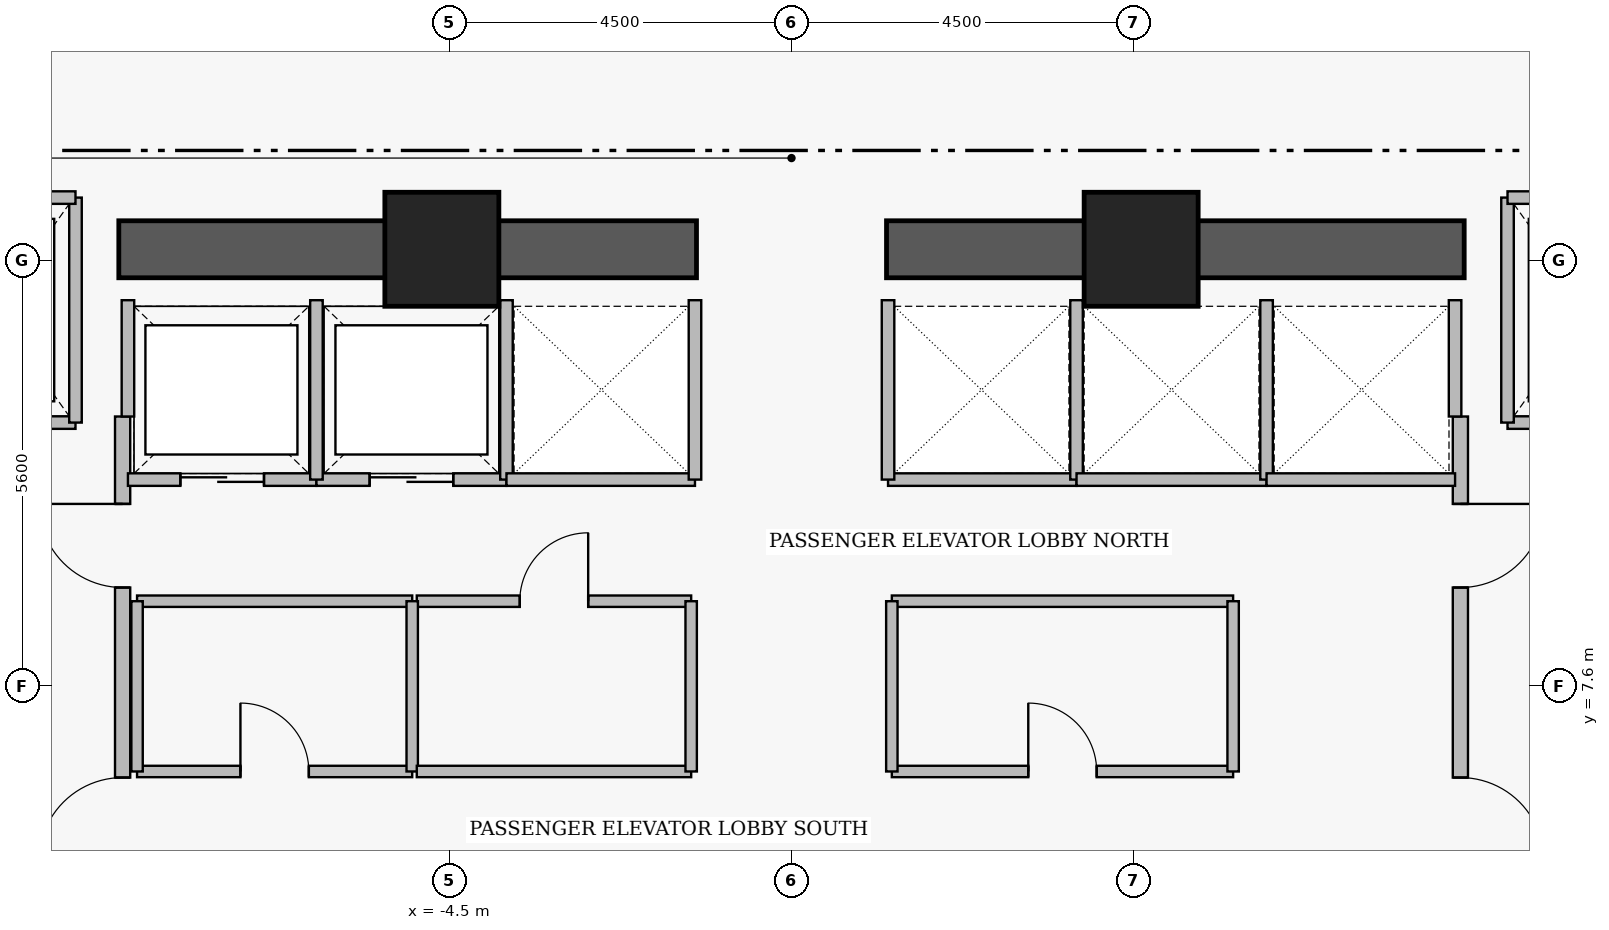
"""IFC4 building model, lengths in metres.
Left out: names, types, materials, properties, quantities, classifications, styles, units other than length and angle.
Written with IfcOpenShell. Run it as: python <this file> out.ifc"""

import sys

from ifc_helpers import new_model, si_unit, direction, frame, frame_2d, origin, origin_2d, place, context, subcontext, project, spatial, rectangle, extrude, element, fill, save


model = new_model("IFC4")
c1 = context("Model", 3, precision=1e-05, world=origin(), true_north=direction((0.0, 1.0)))
c2 = subcontext(c1, "Body", "Model", "MODEL_VIEW")
j1 = project(units=[si_unit("LENGTHUNIT", "METRE"), si_unit("PLANEANGLEUNIT", "RADIAN")], contexts=[c1])
p1 = place(None, origin())
s1 = spatial("IfcSite", under=j1, at=p1, CompositionType="ELEMENT")
p2 = place(p1, origin())
s2 = spatial("IfcBuilding", under=s1, at=p2, CompositionType="ELEMENT")
p3 = place(p2, frame((0.0, 0.0, 95.65)))
s3 = spatial("IfcBuildingStorey", under=s2, at=p3, CompositionType="ELEMENT", Elevation=95.65)
for number, where, z_axis, x_axis in (
    (1, (-8.85, 13.35, 0.0), (0.0, 0.0, 1.0), (1.0, 0.0, 0.0)),
    (2, (1.25, 13.35, 0.0), (0.0, 0.0, 1.0), (1.0, 0.0, 0.0)),
):
    element("IfcWall", number, at=place(p3, frame(where, z_axis=z_axis, x_axis=x_axis)), inside=s3, PredefinedType="SHEAR", context=c2, shape_type="SweptSolid", body=[
        extrude(rectangle(XDim=7.6, YDim=0.75, at=frame_2d((3.8, 0.0))), origin(), (0.0, 0.0, 1.0), 3.43),
    ])
for number, where, z_axis, x_axis in (
    (3, (-4.6, 13.35, 0.0), (0.0, 0.0, 1.0), (1.0, 0.0, 0.0)),
    (4, (4.6, 13.35, 0.0), (0.0, 0.0, 1.0), (1.0, 0.0, 0.0)),
):
    element("IfcColumn", number, at=place(p3, frame(where, z_axis=z_axis, x_axis=x_axis)), inside=s3, PredefinedType="COLUMN", context=c2, shape_type="SweptSolid", body=[
        extrude(rectangle(XDim=1.5, YDim=1.5, at=origin_2d()), origin(), (0.0, 0.0, 1.0), 3.65),
    ])
p4 = place(p3, frame((-8.8, 5.05, 0.0), z_axis=(0.0, 0.0, 1.0), x_axis=(0.0, 1.0, 0.0)))
e5 = element("IfcWall", 5, at=p4, inside=s3, PredefinedType="PARTITIONING", context=c2, shape_type="SweptSolid", body=[
    extrude(rectangle(XDim=6.1, YDim=0.2, at=frame_2d((3.05, 0.0))), origin(), (0.0, 0.0, 1.0), 3.43),
])
p5 = place(p4, frame((0.25, 0.0, 0.0)))
e6 = element("IfcOpeningElement", 6, at=p5, cuts=e5, PredefinedType="OPENING", context=c2, shape_type="SweptSolid", body=[
    extrude(rectangle(XDim=1.1, YDim=2.2, at=frame_2d((0.55, 1.1))), frame((0.0, 0.11, 0.0), z_axis=(0.0, -1.0, 0.0), x_axis=(1.0, 0.0, 0.0)), (0.0, 0.0, 1.0), 0.22),
])
p6 = place(p4, frame((3.85, 0.0, 0.0)))
e7 = element("IfcOpeningElement", 7, at=p6, cuts=e5, PredefinedType="OPENING", context=c2, shape_type="SweptSolid", body=[
    extrude(rectangle(XDim=1.1, YDim=2.2, at=frame_2d((0.55, 1.1))), frame((0.0, 0.11, 0.0), z_axis=(0.0, -1.0, 0.0), x_axis=(1.0, 0.0, 0.0)), (0.0, 0.0, 1.0), 0.22),
])
p7 = place(p3, frame((8.8, 11.15, 0.0), z_axis=(0.0, 0.0, 1.0), x_axis=(0.0, -1.0, 0.0)))
e8 = element("IfcWall", 8, at=p7, inside=s3, PredefinedType="PARTITIONING", context=c2, shape_type="SweptSolid", body=[
    extrude(rectangle(XDim=6.1, YDim=0.2, at=frame_2d((3.05, 0.0))), origin(), (0.0, 0.0, 1.0), 3.43),
])
p8 = place(p7, frame((1.15, 0.0, 0.0)))
e9 = element("IfcOpeningElement", 9, at=p8, cuts=e8, PredefinedType="OPENING", context=c2, shape_type="SweptSolid", body=[
    extrude(rectangle(XDim=1.1, YDim=2.2, at=frame_2d((0.55, 1.1))), frame((0.0, 0.11, 0.0), z_axis=(0.0, -1.0, 0.0), x_axis=(1.0, 0.0, 0.0)), (0.0, 0.0, 1.0), 0.22),
])
p9 = place(p7, frame((4.75, 0.0, 0.0)))
e10 = element("IfcOpeningElement", 10, at=p9, cuts=e8, PredefinedType="OPENING", context=c2, shape_type="SweptSolid", body=[
    extrude(rectangle(XDim=1.1, YDim=2.2, at=frame_2d((0.55, 1.1))), frame((0.0, 0.11, 0.0), z_axis=(0.0, -1.0, 0.0), x_axis=(1.0, 0.0, 0.0)), (0.0, 0.0, 1.0), 0.22),
])
p10 = place(p3, frame((-11.58, 11.07, 0.0), z_axis=(0.0, 0.0, 1.0), x_axis=(1.0, 0.0, 0.0)))
e11 = element("IfcWall", 11, at=p10, inside=s3, PredefinedType="PARTITIONING", context=c2, shape_type="SweptSolid", body=[
    extrude(rectangle(XDim=2.16, YDim=0.165, at=frame_2d((1.08, 0.0))), origin(), (0.0, 0.0, 1.0), 3.43),
])
p11 = place(p10, frame((0.53, 0.0, 0.0)))
e12 = element("IfcOpeningElement", 12, at=p11, cuts=e11, PredefinedType="OPENING", context=c2, shape_type="SweptSolid", body=[
    extrude(rectangle(XDim=1.15, YDim=2.25, at=frame_2d((0.575, 1.125))), frame((0.0, 0.093, 0.0), z_axis=(0.0, -1.0, 0.0), x_axis=(1.0, 0.0, 0.0)), (0.0, 0.0, 1.0), 0.185),
])
p12 = place(p3, frame((9.42, 11.07, 0.0), z_axis=(0.0, 0.0, 1.0), x_axis=(1.0, 0.0, 0.0)))
e13 = element("IfcWall", 13, at=p12, inside=s3, PredefinedType="PARTITIONING", context=c2, shape_type="SweptSolid", body=[
    extrude(rectangle(XDim=2.16, YDim=0.165, at=frame_2d((1.08, 0.0))), origin(), (0.0, 0.0, 1.0), 3.43),
])
p13 = place(p12, frame((0.53, 0.0, 0.0)))
e14 = element("IfcOpeningElement", 14, at=p13, cuts=e13, PredefinedType="OPENING", context=c2, shape_type="SweptSolid", body=[
    extrude(rectangle(XDim=1.15, YDim=2.25, at=frame_2d((0.575, 1.125))), frame((0.0, 0.093, 0.0), z_axis=(0.0, -1.0, 0.0), x_axis=(1.0, 0.0, 0.0)), (0.0, 0.0, 1.0), 0.185),
])
p14 = place(p3, frame((-8.73, 10.32, 0.0), z_axis=(0.0, 0.0, 1.0), x_axis=(1.0, 0.0, 0.0)))
e15 = element("IfcWall", 15, at=p14, inside=s3, PredefinedType="PARTITIONING", context=c2, shape_type="SweptSolid", body=[
    extrude(rectangle(XDim=2.48, YDim=0.165, at=frame_2d((1.24, 0.0))), origin(), (0.0, 0.0, 1.0), 3.43),
])
p15 = place(p14, frame((0.69, 0.0, 0.0)))
e16 = element("IfcOpeningElement", 16, at=p15, cuts=e15, PredefinedType="OPENING", context=c2, shape_type="SweptSolid", body=[
    extrude(rectangle(XDim=1.1, YDim=2.25, at=frame_2d((0.55, 1.125))), frame((0.0, 0.093, 0.0), z_axis=(0.0, -1.0, 0.0), x_axis=(1.0, 0.0, 0.0)), (0.0, 0.0, 1.0), 0.185),
])
p16 = place(p3, frame((-6.25, 10.32, 0.0), z_axis=(0.0, 0.0, 1.0), x_axis=(1.0, 0.0, 0.0)))
e17 = element("IfcWall", 17, at=p16, inside=s3, PredefinedType="PARTITIONING", context=c2, shape_type="SweptSolid", body=[
    extrude(rectangle(XDim=2.5, YDim=0.165, at=frame_2d((1.25, 0.0))), origin(), (0.0, 0.0, 1.0), 3.43),
])
p17 = place(p16, frame((0.7, 0.0, 0.0)))
e18 = element("IfcOpeningElement", 18, at=p17, cuts=e17, PredefinedType="OPENING", context=c2, shape_type="SweptSolid", body=[
    extrude(rectangle(XDim=1.1, YDim=2.25, at=frame_2d((0.55, 1.125))), frame((0.0, 0.093, 0.0), z_axis=(0.0, -1.0, 0.0), x_axis=(1.0, 0.0, 0.0)), (0.0, 0.0, 1.0), 0.185),
])
p18 = place(p3, frame((-8.61, 6.48, 0.0), z_axis=(0.0, 0.0, 1.0), x_axis=(1.0, 0.0, 0.0)))
e19 = element("IfcWall", 19, at=p18, inside=s3, PredefinedType="PARTITIONING", context=c2, shape_type="SweptSolid", body=[
    extrude(rectangle(XDim=3.62, YDim=0.15, at=frame_2d((1.81, 0.0))), origin(), (0.0, 0.0, 1.0), 3.43),
])
p19 = place(p18, frame((1.36, 0.0, 0.0)))
e20 = element("IfcOpeningElement", 20, at=p19, cuts=e19, PredefinedType="OPENING", context=c2, shape_type="SweptSolid", body=[
    extrude(rectangle(XDim=0.9, YDim=2.15, at=frame_2d((0.45, 1.075))), frame((0.0, 0.085, 0.0), z_axis=(0.0, -1.0, 0.0), x_axis=(1.0, 0.0, 0.0)), (0.0, 0.0, 1.0), 0.17),
])
p20 = place(p3, frame((-4.93, 8.72, 0.0), z_axis=(0.0, 0.0, 1.0), x_axis=(1.0, 0.0, 0.0)))
e21 = element("IfcWall", 21, at=p20, inside=s3, PredefinedType="PARTITIONING", context=c2, shape_type="SweptSolid", body=[
    extrude(rectangle(XDim=3.61, YDim=0.15, at=frame_2d((1.805, 0.0))), origin(), (0.0, 0.0, 1.0), 3.43),
])
p21 = place(p20, frame((1.355, 0.0, 0.0)))
e22 = element("IfcOpeningElement", 22, at=p21, cuts=e21, PredefinedType="OPENING", context=c2, shape_type="SweptSolid", body=[
    extrude(rectangle(XDim=0.9, YDim=2.15, at=frame_2d((0.45, 1.075))), frame((0.0, 0.085, 0.0), z_axis=(0.0, -1.0, 0.0), x_axis=(1.0, 0.0, 0.0)), (0.0, 0.0, 1.0), 0.17),
])
p22 = place(p3, frame((1.32, 6.48, 0.0), z_axis=(0.0, 0.0, 1.0), x_axis=(1.0, 0.0, 0.0)))
e23 = element("IfcWall", 23, at=p22, inside=s3, PredefinedType="PARTITIONING", context=c2, shape_type="SweptSolid", body=[
    extrude(rectangle(XDim=4.49, YDim=0.15, at=frame_2d((2.245, 0.0))), origin(), (0.0, 0.0, 1.0), 3.43),
])
p23 = place(p22, frame((1.795, 0.0, 0.0)))
e24 = element("IfcOpeningElement", 24, at=p23, cuts=e23, PredefinedType="OPENING", context=c2, shape_type="SweptSolid", body=[
    extrude(rectangle(XDim=0.9, YDim=2.15, at=frame_2d((0.45, 1.075))), frame((0.0, 0.085, 0.0), z_axis=(0.0, -1.0, 0.0), x_axis=(1.0, 0.0, 0.0)), (0.0, 0.0, 1.0), 0.17),
])
p24 = place(p3, frame((-9.42, 11.07, 0.0), z_axis=(0.0, 0.0, 1.0), x_axis=(0.0, 1.0, 0.0)))
e25 = element("IfcWall", 25, at=p24, inside=s3, PredefinedType="PARTITIONING", context=c2, shape_type="SweptSolid", body=[
    extrude(rectangle(XDim=2.96, YDim=0.165, at=frame_2d((1.48, 0.0))), origin(), (0.0, 0.0, 1.0), 3.43),
])
p25 = place(p3, frame((-11.58, 14.03, 0.0), z_axis=(0.0, 0.0, 1.0), x_axis=(1.0, 0.0, 0.0)))
e26 = element("IfcWall", 26, at=p25, inside=s3, PredefinedType="PARTITIONING", context=c2, shape_type="SweptSolid", body=[
    extrude(rectangle(XDim=2.16, YDim=0.165, at=frame_2d((1.08, 0.0))), origin(), (0.0, 0.0, 1.0), 3.43),
])
p26 = place(p3, frame((9.42, 11.07, 0.0), z_axis=(0.0, 0.0, 1.0), x_axis=(0.0, 1.0, 0.0)))
e27 = element("IfcWall", 27, at=p26, inside=s3, PredefinedType="PARTITIONING", context=c2, shape_type="SweptSolid", body=[
    extrude(rectangle(XDim=2.96, YDim=0.165, at=frame_2d((1.48, 0.0))), origin(), (0.0, 0.0, 1.0), 3.43),
])
p27 = place(p3, frame((9.42, 14.03, 0.0), z_axis=(0.0, 0.0, 1.0), x_axis=(1.0, 0.0, 0.0)))
e28 = element("IfcWall", 28, at=p27, inside=s3, PredefinedType="PARTITIONING", context=c2, shape_type="SweptSolid", body=[
    extrude(rectangle(XDim=2.16, YDim=0.165, at=frame_2d((1.08, 0.0))), origin(), (0.0, 0.0, 1.0), 3.43),
])
p28 = place(p3, frame((-8.73, 11.15, 0.0), z_axis=(0.0, 0.0, 1.0), x_axis=(0.0, 1.0, 0.0)))
e29 = element("IfcWall", 29, at=p28, inside=s3, PredefinedType="PARTITIONING", context=c2, shape_type="SweptSolid", body=[
    extrude(rectangle(XDim=1.53, YDim=0.165, at=frame_2d((0.765, 0.0))), origin(), (0.0, 0.0, 1.0), 3.43),
])
for number, where, z_axis, x_axis in (
    (30, (-6.25, 10.32, 0.0), (0.0, 0.0, 1.0), (0.0, 1.0, 0.0)),
    (31, (-3.75, 10.32, 0.0), (0.0, 0.0, 1.0), (0.0, 1.0, 0.0)),
):
    element("IfcWall", number, at=place(p3, frame(where, z_axis=z_axis, x_axis=x_axis)), inside=s3, PredefinedType="PARTITIONING", context=c2, shape_type="SweptSolid", body=[
        extrude(rectangle(XDim=2.36, YDim=0.165, at=frame_2d((1.18, 0.0))), origin(), (0.0, 0.0, 1.0), 3.43),
    ])
p29 = place(p3, frame((-3.75, 10.32, 0.0), z_axis=(0.0, 0.0, 1.0), x_axis=(1.0, 0.0, 0.0)))
e32 = element("IfcWall", 32, at=p29, inside=s3, PredefinedType="PARTITIONING", context=c2, shape_type="SweptSolid", body=[
    extrude(rectangle(XDim=2.48, YDim=0.165, at=frame_2d((1.24, 0.0))), origin(), (0.0, 0.0, 1.0), 3.43),
])
p30 = place(p3, frame((-1.27, 10.32, 0.0), z_axis=(0.0, 0.0, 1.0), x_axis=(0.0, 1.0, 0.0)))
e33 = element("IfcWall", 33, at=p30, inside=s3, PredefinedType="PARTITIONING", context=c2, shape_type="SweptSolid", body=[
    extrude(rectangle(XDim=2.36, YDim=0.165, at=frame_2d((1.18, 0.0))), origin(), (0.0, 0.0, 1.0), 3.43),
])
p31 = place(p3, frame((1.27, 10.32, 0.0), z_axis=(0.0, 0.0, 1.0), x_axis=(1.0, 0.0, 0.0)))
e34 = element("IfcWall", 34, at=p31, inside=s3, PredefinedType="PARTITIONING", context=c2, shape_type="SweptSolid", body=[
    extrude(rectangle(XDim=2.48, YDim=0.165, at=frame_2d((1.24, 0.0))), origin(), (0.0, 0.0, 1.0), 3.43),
])
for number, where, z_axis, x_axis in (
    (35, (1.27, 10.32, 0.0), (0.0, 0.0, 1.0), (0.0, 1.0, 0.0)),
    (36, (3.75, 10.32, 0.0), (0.0, 0.0, 1.0), (0.0, 1.0, 0.0)),
):
    element("IfcWall", number, at=place(p3, frame(where, z_axis=z_axis, x_axis=x_axis)), inside=s3, PredefinedType="PARTITIONING", context=c2, shape_type="SweptSolid", body=[
        extrude(rectangle(XDim=2.36, YDim=0.165, at=frame_2d((1.18, 0.0))), origin(), (0.0, 0.0, 1.0), 3.43),
    ])
p32 = place(p3, frame((3.75, 10.32, 0.0), z_axis=(0.0, 0.0, 1.0), x_axis=(1.0, 0.0, 0.0)))
e37 = element("IfcWall", 37, at=p32, inside=s3, PredefinedType="PARTITIONING", context=c2, shape_type="SweptSolid", body=[
    extrude(rectangle(XDim=2.5, YDim=0.165, at=frame_2d((1.25, 0.0))), origin(), (0.0, 0.0, 1.0), 3.43),
])
p33 = place(p3, frame((6.25, 10.32, 0.0), z_axis=(0.0, 0.0, 1.0), x_axis=(0.0, 1.0, 0.0)))
e38 = element("IfcWall", 38, at=p33, inside=s3, PredefinedType="PARTITIONING", context=c2, shape_type="SweptSolid", body=[
    extrude(rectangle(XDim=2.36, YDim=0.165, at=frame_2d((1.18, 0.0))), origin(), (0.0, 0.0, 1.0), 3.43),
])
p34 = place(p3, frame((6.25, 10.32, 0.0), z_axis=(0.0, 0.0, 1.0), x_axis=(1.0, 0.0, 0.0)))
e39 = element("IfcWall", 39, at=p34, inside=s3, PredefinedType="PARTITIONING", context=c2, shape_type="SweptSolid", body=[
    extrude(rectangle(XDim=2.48, YDim=0.165, at=frame_2d((1.24, 0.0))), origin(), (0.0, 0.0, 1.0), 3.43),
])
p35 = place(p3, frame((8.73, 11.15, 0.0), z_axis=(0.0, 0.0, 1.0), x_axis=(0.0, 1.0, 0.0)))
e40 = element("IfcWall", 40, at=p35, inside=s3, PredefinedType="PARTITIONING", context=c2, shape_type="SweptSolid", body=[
    extrude(rectangle(XDim=1.53, YDim=0.165, at=frame_2d((0.765, 0.0))), origin(), (0.0, 0.0, 1.0), 3.43),
])
p36 = place(p3, frame((-8.61, 8.72, 0.0), z_axis=(0.0, 0.0, 1.0), x_axis=(1.0, 0.0, 0.0)))
e41 = element("IfcWall", 41, at=p36, inside=s3, PredefinedType="PARTITIONING", context=c2, shape_type="SweptSolid", body=[
    extrude(rectangle(XDim=3.62, YDim=0.15, at=frame_2d((1.81, 0.0))), origin(), (0.0, 0.0, 1.0), 3.43),
])
for number, where, z_axis, x_axis in (
    (42, (-8.61, 6.48, 0.0), (0.0, 0.0, 1.0), (0.0, 1.0, 0.0)),
    (43, (-4.99, 6.48, 0.0), (0.0, 0.0, 1.0), (0.0, 1.0, 0.0)),
):
    element("IfcWall", number, at=place(p3, frame(where, z_axis=z_axis, x_axis=x_axis)), inside=s3, PredefinedType="PARTITIONING", context=c2, shape_type="SweptSolid", body=[
        extrude(rectangle(XDim=2.24, YDim=0.15, at=frame_2d((1.12, 0.0))), origin(), (0.0, 0.0, 1.0), 3.43),
    ])
p37 = place(p3, frame((-4.93, 6.48, 0.0), z_axis=(0.0, 0.0, 1.0), x_axis=(1.0, 0.0, 0.0)))
e44 = element("IfcWall", 44, at=p37, inside=s3, PredefinedType="PARTITIONING", context=c2, shape_type="SweptSolid", body=[
    extrude(rectangle(XDim=3.61, YDim=0.15, at=frame_2d((1.805, 0.0))), origin(), (0.0, 0.0, 1.0), 3.43),
])
p38 = place(p3, frame((-1.32, 6.48, 0.0), z_axis=(0.0, 0.0, 1.0), x_axis=(0.0, 1.0, 0.0)))
e45 = element("IfcWall", 45, at=p38, inside=s3, PredefinedType="PARTITIONING", context=c2, shape_type="SweptSolid", body=[
    extrude(rectangle(XDim=2.24, YDim=0.15, at=frame_2d((1.12, 0.0))), origin(), (0.0, 0.0, 1.0), 3.43),
])
p39 = place(p3, frame((1.32, 8.72, 0.0), z_axis=(0.0, 0.0, 1.0), x_axis=(1.0, 0.0, 0.0)))
e46 = element("IfcWall", 46, at=p39, inside=s3, PredefinedType="PARTITIONING", context=c2, shape_type="SweptSolid", body=[
    extrude(rectangle(XDim=4.49, YDim=0.15, at=frame_2d((2.245, 0.0))), origin(), (0.0, 0.0, 1.0), 3.43),
])
for number, where, z_axis, x_axis in (
    (47, (1.32, 6.48, 0.0), (0.0, 0.0, 1.0), (0.0, 1.0, 0.0)),
    (48, (5.81, 6.48, 0.0), (0.0, 0.0, 1.0), (0.0, 1.0, 0.0)),
):
    element("IfcWall", number, at=place(p3, frame(where, z_axis=z_axis, x_axis=x_axis)), inside=s3, PredefinedType="PARTITIONING", context=c2, shape_type="SweptSolid", body=[
        extrude(rectangle(XDim=2.24, YDim=0.15, at=frame_2d((1.12, 0.0))), origin(), (0.0, 0.0, 1.0), 3.43),
    ])
p40 = place(p5, origin())
e49 = element("IfcDoor", 49, at=p40, inside=s3, OperationType="SINGLE_SWING_LEFT", PredefinedType="DOOR", context=c2, shape_type="SweptSolid", body=[
    extrude(rectangle(XDim=1.1, YDim=2.2, at=frame_2d((0.55, 1.1))), frame((0.0, 0.025, 0.0), z_axis=(0.0, -1.0, 0.0), x_axis=(1.0, 0.0, 0.0)), (0.0, 0.0, 1.0), 0.05),
])
fill(e6, e49)
p41 = place(p6, origin())
e50 = element("IfcDoor", 50, at=p41, inside=s3, OperationType="SINGLE_SWING_RIGHT", PredefinedType="DOOR", context=c2, shape_type="SweptSolid", body=[
    extrude(rectangle(XDim=1.1, YDim=2.2, at=frame_2d((0.55, 1.1))), frame((0.0, 0.025, 0.0), z_axis=(0.0, -1.0, 0.0), x_axis=(1.0, 0.0, 0.0)), (0.0, 0.0, 1.0), 0.05),
])
fill(e7, e50)
p42 = place(p8, origin())
e51 = element("IfcDoor", 51, at=p42, inside=s3, OperationType="SINGLE_SWING_LEFT", PredefinedType="DOOR", context=c2, shape_type="SweptSolid", body=[
    extrude(rectangle(XDim=1.1, YDim=2.2, at=frame_2d((0.55, 1.1))), frame((0.0, 0.025, 0.0), z_axis=(0.0, -1.0, 0.0), x_axis=(1.0, 0.0, 0.0)), (0.0, 0.0, 1.0), 0.05),
])
fill(e9, e51)
p43 = place(p9, origin())
e52 = element("IfcDoor", 52, at=p43, inside=s3, OperationType="SINGLE_SWING_RIGHT", PredefinedType="DOOR", context=c2, shape_type="SweptSolid", body=[
    extrude(rectangle(XDim=1.1, YDim=2.2, at=frame_2d((0.55, 1.1))), frame((0.0, 0.025, 0.0), z_axis=(0.0, -1.0, 0.0), x_axis=(1.0, 0.0, 0.0)), (0.0, 0.0, 1.0), 0.05),
])
fill(e10, e52)
p44 = place(p15, origin())
e53 = element("IfcDoor", 53, at=p44, inside=s3, OperationType="SLIDING_TO_LEFT", PredefinedType="DOOR", context=c2, shape_type="SweptSolid", body=[
    extrude(rectangle(XDim=1.1, YDim=2.25, at=frame_2d((0.55, 1.125))), frame((0.0, 0.025, 0.0), z_axis=(0.0, -1.0, 0.0), x_axis=(1.0, 0.0, 0.0)), (0.0, 0.0, 1.0), 0.05),
])
fill(e16, e53)
p45 = place(p17, origin())
e54 = element("IfcDoor", 54, at=p45, inside=s3, OperationType="SLIDING_TO_LEFT", PredefinedType="DOOR", context=c2, shape_type="SweptSolid", body=[
    extrude(rectangle(XDim=1.1, YDim=2.25, at=frame_2d((0.55, 1.125))), frame((0.0, 0.025, 0.0), z_axis=(0.0, -1.0, 0.0), x_axis=(1.0, 0.0, 0.0)), (0.0, 0.0, 1.0), 0.05),
])
fill(e18, e54)
p46 = place(p19, origin())
e55 = element("IfcDoor", 55, at=p46, inside=s3, OperationType="SINGLE_SWING_LEFT", PredefinedType="DOOR", context=c2, shape_type="SweptSolid", body=[
    extrude(rectangle(XDim=0.9, YDim=2.15, at=frame_2d((0.45, 1.075))), frame((0.0, 0.025, 0.0), z_axis=(0.0, -1.0, 0.0), x_axis=(1.0, 0.0, 0.0)), (0.0, 0.0, 1.0), 0.05),
])
fill(e20, e55)
p47 = place(p21, origin())
e56 = element("IfcDoor", 56, at=p47, inside=s3, OperationType="SINGLE_SWING_RIGHT", PredefinedType="DOOR", context=c2, shape_type="SweptSolid", body=[
    extrude(rectangle(XDim=0.9, YDim=2.15, at=frame_2d((0.45, 1.075))), frame((0.0, 0.025, 0.0), z_axis=(0.0, -1.0, 0.0), x_axis=(1.0, 0.0, 0.0)), (0.0, 0.0, 1.0), 0.05),
])
fill(e22, e56)
p48 = place(p23, origin())
e57 = element("IfcDoor", 57, at=p48, inside=s3, OperationType="SINGLE_SWING_LEFT", PredefinedType="DOOR", context=c2, shape_type="SweptSolid", body=[
    extrude(rectangle(XDim=0.9, YDim=2.15, at=frame_2d((0.45, 1.075))), frame((0.0, 0.025, 0.0), z_axis=(0.0, -1.0, 0.0), x_axis=(1.0, 0.0, 0.0)), (0.0, 0.0, 1.0), 0.05),
])
fill(e24, e57)
save(model, sys.argv[1])
